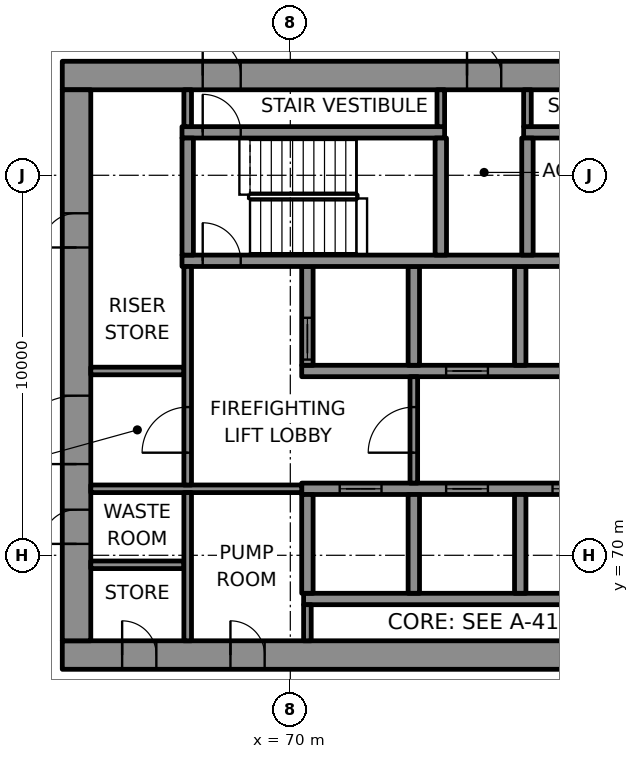
"""IFC4 building model, lengths in metres.
Left out: names, types, materials, properties, quantities, classifications, styles, units other than length and angle.
Written with IfcOpenShell. Run it as: python <this file> out.ifc"""

import sys

from ifc_helpers import new_model, si_unit, direction, frame, frame_2d, origin, place, context, subcontext, project, spatial, rectangle, extrude, element, fill, save


model = new_model("IFC4")
c1 = context("Model", 3, precision=1e-05, world=origin(), true_north=direction((0.0, 1.0)))
c2 = subcontext(c1, "Body", "Model", "MODEL_VIEW")
j1 = project(units=[si_unit("LENGTHUNIT", "METRE"), si_unit("PLANEANGLEUNIT", "RADIAN")], contexts=[c1])
p1 = place(None, origin())
s1 = spatial("IfcSite", under=j1, at=p1, CompositionType="ELEMENT")
p2 = place(p1, origin())
s2 = spatial("IfcBuilding", under=s1, at=p2, CompositionType="ELEMENT")
p3 = place(p2, frame((0.0, 0.0, 190.9)))
s3 = spatial("IfcBuildingStorey", under=s2, at=p3, CompositionType="ELEMENT", Elevation=190.9)
p4 = place(p3, frame((64.0, 67.375, 0.0), z_axis=(0.0, 0.0, 1.0), x_axis=(1.0, 0.0, 0.0)))
e1 = element("IfcWall", 1, at=p4, inside=s3, PredefinedType="SHEAR", context=c2, shape_type="SweptSolid", body=[
    extrude(rectangle(XDim=22.0, YDim=0.75, at=frame_2d((11.0, 0.0))), origin(), (0.0, 0.0, 1.0), 3.7),
])
p5 = place(p4, frame((1.575, 0.0, 0.0)))
e2 = element("IfcOpeningElement", 2, at=p5, cuts=e1, PredefinedType="OPENING", context=c2, shape_type="SweptSolid", body=[
    extrude(rectangle(XDim=0.9, YDim=2.1, at=frame_2d((0.45, 1.05))), frame((0.0, 0.385, 0.0), z_axis=(0.0, -1.0, 0.0), x_axis=(1.0, 0.0, 0.0)), (0.0, 0.0, 1.0), 0.77),
])
p6 = place(p4, frame((4.425, 0.0, 0.0)))
e3 = element("IfcOpeningElement", 3, at=p6, cuts=e1, PredefinedType="OPENING", context=c2, shape_type="SweptSolid", body=[
    extrude(rectangle(XDim=0.9, YDim=2.1, at=frame_2d((0.45, 1.05))), frame((0.0, 0.385, 0.0), z_axis=(0.0, -1.0, 0.0), x_axis=(1.0, 0.0, 0.0)), (0.0, 0.0, 1.0), 0.77),
])
p7 = place(p3, frame((64.0, 82.625, 0.0), z_axis=(0.0, 0.0, 1.0), x_axis=(1.0, 0.0, 0.0)))
e4 = element("IfcWall", 4, at=p7, inside=s3, PredefinedType="SHEAR", context=c2, shape_type="SweptSolid", body=[
    extrude(rectangle(XDim=22.0, YDim=0.75, at=frame_2d((11.0, 0.0))), origin(), (0.0, 0.0, 1.0), 3.7),
])
p8 = place(p7, frame((3.695, 0.0, 0.0)))
e5 = element("IfcOpeningElement", 5, at=p8, cuts=e4, PredefinedType="OPENING", context=c2, shape_type="SweptSolid", body=[
    extrude(rectangle(XDim=1.0, YDim=2.1, at=frame_2d((0.5, 1.05))), frame((0.0, 0.385, 0.0), z_axis=(0.0, -1.0, 0.0), x_axis=(1.0, 0.0, 0.0)), (0.0, 0.0, 1.0), 0.77),
])
p9 = place(p7, frame((17.505, 0.0, 0.0)))
e6 = element("IfcOpeningElement", 6, at=p9, cuts=e4, PredefinedType="OPENING", context=c2, shape_type="SweptSolid", body=[
    extrude(rectangle(XDim=1.0, YDim=2.1, at=frame_2d((0.5, 1.05))), frame((0.0, 0.385, 0.0), z_axis=(0.0, -1.0, 0.0), x_axis=(1.0, 0.0, 0.0)), (0.0, 0.0, 1.0), 0.77),
])
p10 = place(p7, frame((10.65, 0.0, 0.0)))
e7 = element("IfcOpeningElement", 7, at=p10, cuts=e4, PredefinedType="OPENING", context=c2, shape_type="SweptSolid", body=[
    extrude(rectangle(XDim=0.9, YDim=2.1, at=frame_2d((0.45, 1.05))), frame((0.0, 0.385, 0.0), z_axis=(0.0, -1.0, 0.0), x_axis=(1.0, 0.0, 0.0)), (0.0, 0.0, 1.0), 0.77),
])
p11 = place(p3, frame((64.375, 67.75, 0.0), z_axis=(0.0, 0.0, 1.0), x_axis=(0.0, 1.0, 0.0)))
e8 = element("IfcWall", 8, at=p11, inside=s3, PredefinedType="SHEAR", context=c2, shape_type="SweptSolid", body=[
    extrude(rectangle(XDim=14.5, YDim=0.75, at=frame_2d((7.25, 0.0))), origin(), (0.0, 0.0, 1.0), 3.7),
])
p12 = place(p11, frame((4.65, 0.0, 0.0)))
e9 = element("IfcOpeningElement", 9, at=p12, cuts=e8, PredefinedType="OPENING", context=c2, shape_type="SweptSolid", body=[
    extrude(rectangle(XDim=1.8, YDim=2.1, at=frame_2d((0.9, 1.05))), frame((0.0, 0.385, 0.0), z_axis=(0.0, -1.0, 0.0), x_axis=(1.0, 0.0, 0.0)), (0.0, 0.0, 1.0), 0.77),
])
p13 = place(p11, frame((2.55, 0.0, 0.0)))
e10 = element("IfcOpeningElement", 10, at=p13, cuts=e8, PredefinedType="OPENING", context=c2, shape_type="SweptSolid", body=[
    extrude(rectangle(XDim=0.9, YDim=2.1, at=frame_2d((0.45, 1.05))), frame((0.0, 0.385, 0.0), z_axis=(0.0, -1.0, 0.0), x_axis=(1.0, 0.0, 0.0)), (0.0, 0.0, 1.0), 0.77),
])
p14 = place(p11, frame((10.35, 0.0, 0.0)))
e11 = element("IfcOpeningElement", 11, at=p14, cuts=e8, PredefinedType="OPENING", context=c2, shape_type="SweptSolid", body=[
    extrude(rectangle(XDim=0.9, YDim=2.1, at=frame_2d((0.45, 1.05))), frame((0.0, 0.385, 0.0), z_axis=(0.0, -1.0, 0.0), x_axis=(1.0, 0.0, 0.0)), (0.0, 0.0, 1.0), 0.77),
])
p15 = place(p3, frame((70.35, 68.85, 0.0), z_axis=(0.0, 0.0, 1.0), x_axis=(1.0, 0.0, 0.0)))
e12 = element("IfcWall", 12, at=p15, inside=s3, PredefinedType="SHEAR", context=c2, shape_type="SweptSolid", body=[
    extrude(rectangle(XDim=14.2, YDim=0.3, at=frame_2d((7.1, 0.0))), origin(), (0.0, 0.0, 1.0), 3.7),
])
p16 = place(p3, frame((70.3, 71.75, 0.0), z_axis=(0.0, 0.0, 1.0), x_axis=(1.0, 0.0, 0.0)))
e13 = element("IfcWall", 13, at=p16, inside=s3, PredefinedType="SHEAR", context=c2, shape_type="SweptSolid", body=[
    extrude(rectangle(XDim=14.3, YDim=0.3, at=frame_2d((7.15, 0.0))), origin(), (0.0, 0.0, 1.0), 3.7),
])
p17 = place(p16, frame((1.0, 0.0, 0.0)))
e14 = element("IfcOpeningElement", 14, at=p17, cuts=e13, PredefinedType="OPENING", context=c2, shape_type="SweptSolid", body=[
    extrude(rectangle(XDim=1.1, YDim=2.1, at=frame_2d((0.55, 1.05))), frame((0.0, 0.16, 0.0), z_axis=(0.0, -1.0, 0.0), x_axis=(1.0, 0.0, 0.0)), (0.0, 0.0, 1.0), 0.32),
])
p18 = place(p16, frame((3.8, 0.0, 0.0)))
e15 = element("IfcOpeningElement", 15, at=p18, cuts=e13, PredefinedType="OPENING", context=c2, shape_type="SweptSolid", body=[
    extrude(rectangle(XDim=1.1, YDim=2.1, at=frame_2d((0.55, 1.05))), frame((0.0, 0.16, 0.0), z_axis=(0.0, -1.0, 0.0), x_axis=(1.0, 0.0, 0.0)), (0.0, 0.0, 1.0), 0.32),
])
p19 = place(p16, frame((6.6, 0.0, 0.0)))
e16 = element("IfcOpeningElement", 16, at=p19, cuts=e13, PredefinedType="OPENING", context=c2, shape_type="SweptSolid", body=[
    extrude(rectangle(XDim=1.1, YDim=2.1, at=frame_2d((0.55, 1.05))), frame((0.0, 0.16, 0.0), z_axis=(0.0, -1.0, 0.0), x_axis=(1.0, 0.0, 0.0)), (0.0, 0.0, 1.0), 0.32),
])
p20 = place(p16, frame((9.4, 0.0, 0.0)))
e17 = element("IfcOpeningElement", 17, at=p20, cuts=e13, PredefinedType="OPENING", context=c2, shape_type="SweptSolid", body=[
    extrude(rectangle(XDim=1.1, YDim=2.1, at=frame_2d((0.55, 1.05))), frame((0.0, 0.16, 0.0), z_axis=(0.0, -1.0, 0.0), x_axis=(1.0, 0.0, 0.0)), (0.0, 0.0, 1.0), 0.32),
])
p21 = place(p16, frame((12.2, 0.0, 0.0)))
e18 = element("IfcOpeningElement", 18, at=p21, cuts=e13, PredefinedType="OPENING", context=c2, shape_type="SweptSolid", body=[
    extrude(rectangle(XDim=1.1, YDim=2.1, at=frame_2d((0.55, 1.05))), frame((0.0, 0.16, 0.0), z_axis=(0.0, -1.0, 0.0), x_axis=(1.0, 0.0, 0.0)), (0.0, 0.0, 1.0), 0.32),
])
p22 = place(p3, frame((70.3, 74.85, 0.0), z_axis=(0.0, 0.0, 1.0), x_axis=(1.0, 0.0, 0.0)))
e19 = element("IfcWall", 19, at=p22, inside=s3, PredefinedType="SHEAR", context=c2, shape_type="SweptSolid", body=[
    extrude(rectangle(XDim=14.3, YDim=0.3, at=frame_2d((7.15, 0.0))), origin(), (0.0, 0.0, 1.0), 3.7),
])
p23 = place(p22, frame((3.8, 0.0, 0.0)))
e20 = element("IfcOpeningElement", 20, at=p23, cuts=e19, PredefinedType="OPENING", context=c2, shape_type="SweptSolid", body=[
    extrude(rectangle(XDim=1.1, YDim=2.1, at=frame_2d((0.55, 1.05))), frame((0.0, 0.16, 0.0), z_axis=(0.0, -1.0, 0.0), x_axis=(1.0, 0.0, 0.0)), (0.0, 0.0, 1.0), 0.32),
])
p24 = place(p22, frame((12.2, 0.0, 0.0)))
e21 = element("IfcOpeningElement", 21, at=p24, cuts=e19, PredefinedType="OPENING", context=c2, shape_type="SweptSolid", body=[
    extrude(rectangle(XDim=1.1, YDim=2.1, at=frame_2d((0.55, 1.05))), frame((0.0, 0.16, 0.0), z_axis=(0.0, -1.0, 0.0), x_axis=(1.0, 0.0, 0.0)), (0.0, 0.0, 1.0), 0.32),
])
p25 = place(p3, frame((70.45, 69.0, 0.0), z_axis=(0.0, 0.0, 1.0), x_axis=(0.0, 1.0, 0.0)))
e22 = element("IfcWall", 22, at=p25, inside=s3, PredefinedType="SHEAR", context=c2, shape_type="SweptSolid", body=[
    extrude(rectangle(XDim=2.6, YDim=0.3, at=frame_2d((1.3, 0.0))), origin(), (0.0, 0.0, 1.0), 3.7),
])
p26 = place(p3, frame((70.45, 75.0, 0.0), z_axis=(0.0, 0.0, 1.0), x_axis=(0.0, 1.0, 0.0)))
e23 = element("IfcWall", 23, at=p26, inside=s3, PredefinedType="SHEAR", context=c2, shape_type="SweptSolid", body=[
    extrude(rectangle(XDim=2.6, YDim=0.3, at=frame_2d((1.3, 0.0))), origin(), (0.0, 0.0, 1.0), 3.7),
])
p27 = place(p26, frame((0.15, 0.0, 0.0)))
e24 = element("IfcOpeningElement", 24, at=p27, cuts=e23, PredefinedType="OPENING", context=c2, shape_type="SweptSolid", body=[
    extrude(rectangle(XDim=1.1, YDim=2.1, at=frame_2d((0.55, 1.05))), frame((0.0, 0.16, 0.0), z_axis=(0.0, -1.0, 0.0), x_axis=(1.0, 0.0, 0.0)), (0.0, 0.0, 1.0), 0.32),
])
for number, where, z_axis, x_axis in (
    (25, (73.25, 69.0, 0.0), (0.0, 0.0, 1.0), (0.0, 1.0, 0.0)),
    (26, (73.25, 75.0, 0.0), (0.0, 0.0, 1.0), (0.0, 1.0, 0.0)),
    (27, (76.05, 69.0, 0.0), (0.0, 0.0, 1.0), (0.0, 1.0, 0.0)),
    (28, (76.05, 75.0, 0.0), (0.0, 0.0, 1.0), (0.0, 1.0, 0.0)),
):
    element("IfcWall", number, at=place(p3, frame(where, z_axis=z_axis, x_axis=x_axis)), inside=s3, PredefinedType="SHEAR", context=c2, shape_type="SweptSolid", body=[
        extrude(rectangle(XDim=2.6, YDim=0.3, at=frame_2d((1.3, 0.0))), origin(), (0.0, 0.0, 1.0), 3.7),
    ])
p28 = place(p3, frame((67.15, 77.75, 0.0), z_axis=(0.0, 0.0, 1.0), x_axis=(1.0, 0.0, 0.0)))
e29 = element("IfcWall", 29, at=p28, inside=s3, PredefinedType="SHEAR", context=c2, shape_type="SweptSolid", body=[
    extrude(rectangle(XDim=17.45, YDim=0.3, at=frame_2d((8.725, 0.0))), origin(), (0.0, 0.0, 1.0), 3.7),
])
p29 = place(p28, frame((0.545, 0.0, 0.0)))
e30 = element("IfcOpeningElement", 30, at=p29, cuts=e29, PredefinedType="OPENING", context=c2, shape_type="SweptSolid", body=[
    extrude(rectangle(XDim=1.0, YDim=2.1, at=frame_2d((0.5, 1.05))), frame((0.0, 0.16, 0.0), z_axis=(0.0, -1.0, 0.0), x_axis=(1.0, 0.0, 0.0)), (0.0, 0.0, 1.0), 0.32),
])
p30 = place(p3, frame((67.15, 81.13, 0.0), z_axis=(0.0, 0.0, 1.0), x_axis=(1.0, 0.0, 0.0)))
e31 = element("IfcWall", 31, at=p30, inside=s3, PredefinedType="SHEAR", context=c2, shape_type="SweptSolid", body=[
    extrude(rectangle(XDim=6.91, YDim=0.3, at=frame_2d((3.455, 0.0))), origin(), (0.0, 0.0, 1.0), 3.7),
])
p31 = place(p30, frame((0.545, 0.0, 0.0)))
e32 = element("IfcOpeningElement", 32, at=p31, cuts=e31, PredefinedType="OPENING", context=c2, shape_type="SweptSolid", body=[
    extrude(rectangle(XDim=1.0, YDim=2.1, at=frame_2d((0.5, 1.05))), frame((0.0, 0.16, 0.0), z_axis=(0.0, -1.0, 0.0), x_axis=(1.0, 0.0, 0.0)), (0.0, 0.0, 1.0), 0.32),
])
p32 = place(p3, frame((76.14, 81.13, 0.0), z_axis=(0.0, 0.0, 1.0), x_axis=(1.0, 0.0, 0.0)))
e33 = element("IfcWall", 33, at=p32, inside=s3, PredefinedType="SHEAR", context=c2, shape_type="SweptSolid", body=[
    extrude(rectangle(XDim=6.86, YDim=0.3, at=frame_2d((3.43, 0.0))), origin(), (0.0, 0.0, 1.0), 3.7),
])
p33 = place(p32, frame((5.365, 0.0, 0.0)))
e34 = element("IfcOpeningElement", 34, at=p33, cuts=e33, PredefinedType="OPENING", context=c2, shape_type="SweptSolid", body=[
    extrude(rectangle(XDim=1.0, YDim=2.1, at=frame_2d((0.5, 1.05))), frame((0.0, 0.16, 0.0), z_axis=(0.0, -1.0, 0.0), x_axis=(1.0, 0.0, 0.0)), (0.0, 0.0, 1.0), 0.32),
])
for number, where, z_axis, x_axis in (
    (35, (67.3, 77.9, 0.0), (0.0, 0.0, 1.0), (0.0, 1.0, 0.0)),
    (36, (73.96, 77.9, 0.0), (0.0, 0.0, 1.0), (0.0, 1.0, 0.0)),
    (37, (76.24, 77.9, 0.0), (0.0, 0.0, 1.0), (0.0, 1.0, 0.0)),
):
    element("IfcWall", number, at=place(p3, frame(where, z_axis=z_axis, x_axis=x_axis)), inside=s3, PredefinedType="SHEAR", context=c2, shape_type="SweptSolid", body=[
        extrude(rectangle(XDim=3.08, YDim=0.3, at=frame_2d((1.54, 0.0))), origin(), (0.0, 0.0, 1.0), 3.7),
    ])
p34 = place(p3, frame((64.75, 69.75, 0.0), z_axis=(0.0, 0.0, 1.0), x_axis=(1.0, 0.0, 0.0)))
e38 = element("IfcWall", 38, at=p34, inside=s3, PredefinedType="PARTITIONING", context=c2, shape_type="SweptSolid", body=[
    extrude(rectangle(XDim=2.45, YDim=0.2, at=frame_2d((1.225, 0.0))), origin(), (0.0, 0.0, 1.0), 3.7),
])
p35 = place(p3, frame((64.75, 71.75, 0.0), z_axis=(0.0, 0.0, 1.0), x_axis=(1.0, 0.0, 0.0)))
e39 = element("IfcWall", 39, at=p35, inside=s3, PredefinedType="PARTITIONING", context=c2, shape_type="SweptSolid", body=[
    extrude(rectangle(XDim=5.55, YDim=0.2, at=frame_2d((2.775, 0.0))), origin(), (0.0, 0.0, 1.0), 3.7),
])
p36 = place(p3, frame((64.75, 74.85, 0.0), z_axis=(0.0, 0.0, 1.0), x_axis=(1.0, 0.0, 0.0)))
e40 = element("IfcWall", 40, at=p36, inside=s3, PredefinedType="PARTITIONING", context=c2, shape_type="SweptSolid", body=[
    extrude(rectangle(XDim=2.45, YDim=0.2, at=frame_2d((1.225, 0.0))), origin(), (0.0, 0.0, 1.0), 3.7),
])
p37 = place(p3, frame((67.3, 67.75, 0.0), z_axis=(0.0, 0.0, 1.0), x_axis=(0.0, 1.0, 0.0)))
e41 = element("IfcWall", 41, at=p37, inside=s3, PredefinedType="PARTITIONING", context=c2, shape_type="SweptSolid", body=[
    extrude(rectangle(XDim=3.9, YDim=0.2, at=frame_2d((1.95, 0.0))), origin(), (0.0, 0.0, 1.0), 3.7),
])
p38 = place(p3, frame((67.3, 71.85, 0.0), z_axis=(0.0, 0.0, 1.0), x_axis=(0.0, 1.0, 0.0)))
e42 = element("IfcWall", 42, at=p38, inside=s3, PredefinedType="PARTITIONING", context=c2, shape_type="SweptSolid", body=[
    extrude(rectangle(XDim=5.75, YDim=0.2, at=frame_2d((2.875, 0.0))), origin(), (0.0, 0.0, 1.0), 3.7),
])
p39 = place(p38, frame((0.85, 0.0, 0.0)))
e43 = element("IfcOpeningElement", 43, at=p39, cuts=e42, PredefinedType="OPENING", context=c2, shape_type="SweptSolid", body=[
    extrude(rectangle(XDim=1.2, YDim=2.1, at=frame_2d((0.6, 1.05))), frame((0.0, 0.11, 0.0), z_axis=(0.0, -1.0, 0.0), x_axis=(1.0, 0.0, 0.0)), (0.0, 0.0, 1.0), 0.22),
])
p40 = place(p3, frame((67.3, 81.28, 0.0), z_axis=(0.0, 0.0, 1.0), x_axis=(0.0, 1.0, 0.0)))
e44 = element("IfcWall", 44, at=p40, inside=s3, PredefinedType="PARTITIONING", context=c2, shape_type="SweptSolid", body=[
    extrude(rectangle(XDim=0.97, YDim=0.2, at=frame_2d((0.485, 0.0))), origin(), (0.0, 0.0, 1.0), 3.7),
])
p41 = place(p3, frame((70.45, 67.75, 0.0), z_axis=(0.0, 0.0, 1.0), x_axis=(0.0, 1.0, 0.0)))
e45 = element("IfcWall", 45, at=p41, inside=s3, PredefinedType="PARTITIONING", context=c2, shape_type="SweptSolid", body=[
    extrude(rectangle(XDim=0.95, YDim=0.2, at=frame_2d((0.475, 0.0))), origin(), (0.0, 0.0, 1.0), 3.7),
])
p42 = place(p3, frame((73.25, 71.9, 0.0), z_axis=(0.0, 0.0, 1.0), x_axis=(0.0, 1.0, 0.0)))
e46 = element("IfcWall", 46, at=p42, inside=s3, PredefinedType="PARTITIONING", context=c2, shape_type="SweptSolid", body=[
    extrude(rectangle(XDim=2.8, YDim=0.2, at=frame_2d((1.4, 0.0))), origin(), (0.0, 0.0, 1.0), 3.7),
])
p43 = place(p42, frame((0.8, 0.0, 0.0)))
e47 = element("IfcOpeningElement", 47, at=p43, cuts=e46, PredefinedType="OPENING", context=c2, shape_type="SweptSolid", body=[
    extrude(rectangle(XDim=1.2, YDim=2.1, at=frame_2d((0.6, 1.05))), frame((0.0, 0.11, 0.0), z_axis=(0.0, -1.0, 0.0), x_axis=(1.0, 0.0, 0.0)), (0.0, 0.0, 1.0), 0.22),
])
for number, where, z_axis, x_axis in (
    (48, (73.96, 81.28, 0.0), (0.0, 0.0, 1.0), (0.0, 1.0, 0.0)),
    (49, (76.24, 81.28, 0.0), (0.0, 0.0, 1.0), (0.0, 1.0, 0.0)),
):
    element("IfcWall", number, at=place(p3, frame(where, z_axis=z_axis, x_axis=x_axis)), inside=s3, PredefinedType="PARTITIONING", context=c2, shape_type="SweptSolid", body=[
        extrude(rectangle(XDim=0.97, YDim=0.2, at=frame_2d((0.485, 0.0))), origin(), (0.0, 0.0, 1.0), 3.7),
    ])
p44 = place(p17, origin())
e50 = element("IfcDoor", 50, at=p44, inside=s3, OperationType="DOUBLE_DOOR_SLIDING", PredefinedType="DOOR", context=c2, shape_type="SweptSolid", body=[
    extrude(rectangle(XDim=1.1, YDim=2.1, at=frame_2d((0.55, 1.05))), frame((0.0, 0.025, 0.0), z_axis=(0.0, -1.0, 0.0), x_axis=(1.0, 0.0, 0.0)), (0.0, 0.0, 1.0), 0.05),
])
fill(e14, e50)
p45 = place(p18, origin())
e51 = element("IfcDoor", 51, at=p45, inside=s3, OperationType="DOUBLE_DOOR_SLIDING", PredefinedType="DOOR", context=c2, shape_type="SweptSolid", body=[
    extrude(rectangle(XDim=1.1, YDim=2.1, at=frame_2d((0.55, 1.05))), frame((0.0, 0.025, 0.0), z_axis=(0.0, -1.0, 0.0), x_axis=(1.0, 0.0, 0.0)), (0.0, 0.0, 1.0), 0.05),
])
fill(e15, e51)
p46 = place(p19, origin())
e52 = element("IfcDoor", 52, at=p46, inside=s3, OperationType="DOUBLE_DOOR_SLIDING", PredefinedType="DOOR", context=c2, shape_type="SweptSolid", body=[
    extrude(rectangle(XDim=1.1, YDim=2.1, at=frame_2d((0.55, 1.05))), frame((0.0, 0.025, 0.0), z_axis=(0.0, -1.0, 0.0), x_axis=(1.0, 0.0, 0.0)), (0.0, 0.0, 1.0), 0.05),
])
fill(e16, e52)
p47 = place(p27, origin())
e53 = element("IfcDoor", 53, at=p47, inside=s3, OperationType="DOUBLE_DOOR_SLIDING", PredefinedType="DOOR", context=c2, shape_type="SweptSolid", body=[
    extrude(rectangle(XDim=1.1, YDim=2.1, at=frame_2d((0.55, 1.05))), frame((0.0, 0.025, 0.0), z_axis=(0.0, -1.0, 0.0), x_axis=(1.0, 0.0, 0.0)), (0.0, 0.0, 1.0), 0.05),
])
fill(e24, e53)
p48 = place(p23, origin())
e54 = element("IfcDoor", 54, at=p48, inside=s3, OperationType="DOUBLE_DOOR_SLIDING", PredefinedType="DOOR", context=c2, shape_type="SweptSolid", body=[
    extrude(rectangle(XDim=1.1, YDim=2.1, at=frame_2d((0.55, 1.05))), frame((0.0, 0.025, 0.0), z_axis=(0.0, -1.0, 0.0), x_axis=(1.0, 0.0, 0.0)), (0.0, 0.0, 1.0), 0.05),
])
fill(e20, e54)
p49 = place(p29, origin())
e55 = element("IfcDoor", 55, at=p49, inside=s3, OperationType="SINGLE_SWING_LEFT", PredefinedType="DOOR", context=c2, shape_type="SweptSolid", body=[
    extrude(rectangle(XDim=1.0, YDim=2.1, at=frame_2d((0.5, 1.05))), frame((0.0, 0.025, 0.0), z_axis=(0.0, -1.0, 0.0), x_axis=(1.0, 0.0, 0.0)), (0.0, 0.0, 1.0), 0.05),
])
fill(e30, e55)
p50 = place(p31, origin())
e56 = element("IfcDoor", 56, at=p50, inside=s3, OperationType="SINGLE_SWING_RIGHT", PredefinedType="DOOR", context=c2, shape_type="SweptSolid", body=[
    extrude(rectangle(XDim=1.0, YDim=2.1, at=frame_2d((0.5, 1.05))), frame((0.0, 0.025, 0.0), z_axis=(0.0, -1.0, 0.0), x_axis=(1.0, 0.0, 0.0)), (0.0, 0.0, 1.0), 0.05),
])
fill(e32, e56)
p51 = place(p8, origin())
e57 = element("IfcDoor", 57, at=p51, inside=s3, OperationType="SINGLE_SWING_LEFT", PredefinedType="DOOR", context=c2, shape_type="SweptSolid", body=[
    extrude(rectangle(XDim=1.0, YDim=2.1, at=frame_2d((0.5, 1.05))), frame((0.0, 0.095, 0.0), z_axis=(0.0, -1.0, 0.0), x_axis=(1.0, 0.0, 0.0)), (0.0, 0.0, 1.0), 0.19),
])
fill(e5, e57)
p52 = place(p43, origin())
e58 = element("IfcDoor", 58, at=p52, inside=s3, OperationType="SINGLE_SWING_LEFT", PredefinedType="DOOR", context=c2, shape_type="SweptSolid", body=[
    extrude(rectangle(XDim=1.2, YDim=2.1, at=frame_2d((0.6, 1.05))), frame((0.0, 0.025, 0.0), z_axis=(0.0, -1.0, 0.0), x_axis=(1.0, 0.0, 0.0)), (0.0, 0.0, 1.0), 0.05),
])
fill(e47, e58)
p53 = place(p39, origin())
e59 = element("IfcDoor", 59, at=p53, inside=s3, OperationType="SINGLE_SWING_RIGHT", PredefinedType="DOOR", context=c2, shape_type="SweptSolid", body=[
    extrude(rectangle(XDim=1.2, YDim=2.1, at=frame_2d((0.6, 1.05))), frame((0.0, 0.025, 0.0), z_axis=(0.0, -1.0, 0.0), x_axis=(1.0, 0.0, 0.0)), (0.0, 0.0, 1.0), 0.05),
])
fill(e43, e59)
p54 = place(p12, origin())
e60 = element("IfcDoor", 60, at=p54, inside=s3, OperationType="SINGLE_SWING_LEFT", PredefinedType="DOOR", context=c2, shape_type="SweptSolid", body=[
    extrude(rectangle(XDim=1.8, YDim=2.1, at=frame_2d((0.9, 1.05))), frame((0.0, 0.095, 0.0), z_axis=(0.0, -1.0, 0.0), x_axis=(1.0, 0.0, 0.0)), (0.0, 0.0, 1.0), 0.19),
])
fill(e9, e60)
p55 = place(p5, origin())
e61 = element("IfcDoor", 61, at=p55, inside=s3, OperationType="SINGLE_SWING_LEFT", PredefinedType="DOOR", context=c2, shape_type="SweptSolid", body=[
    extrude(rectangle(XDim=0.9, YDim=2.1, at=frame_2d((0.45, 1.05))), frame((0.0, 0.095, 0.0), z_axis=(0.0, -1.0, 0.0), x_axis=(1.0, 0.0, 0.0)), (0.0, 0.0, 1.0), 0.19),
])
fill(e2, e61)
p56 = place(p13, origin())
e62 = element("IfcDoor", 62, at=p56, inside=s3, OperationType="SINGLE_SWING_RIGHT", PredefinedType="DOOR", context=c2, shape_type="SweptSolid", body=[
    extrude(rectangle(XDim=0.9, YDim=2.1, at=frame_2d((0.45, 1.05))), frame((0.0, 0.095, 0.0), z_axis=(0.0, -1.0, 0.0), x_axis=(1.0, 0.0, 0.0)), (0.0, 0.0, 1.0), 0.19),
])
fill(e10, e62)
p57 = place(p6, origin())
e63 = element("IfcDoor", 63, at=p57, inside=s3, OperationType="SINGLE_SWING_LEFT", PredefinedType="DOOR", context=c2, shape_type="SweptSolid", body=[
    extrude(rectangle(XDim=0.9, YDim=2.1, at=frame_2d((0.45, 1.05))), frame((0.0, 0.095, 0.0), z_axis=(0.0, -1.0, 0.0), x_axis=(1.0, 0.0, 0.0)), (0.0, 0.0, 1.0), 0.19),
])
fill(e3, e63)
p58 = place(p14, origin())
e64 = element("IfcDoor", 64, at=p58, inside=s3, OperationType="SINGLE_SWING_RIGHT", PredefinedType="DOOR", context=c2, shape_type="SweptSolid", body=[
    extrude(rectangle(XDim=0.9, YDim=2.1, at=frame_2d((0.45, 1.05))), frame((0.0, 0.095, 0.0), z_axis=(0.0, -1.0, 0.0), x_axis=(1.0, 0.0, 0.0)), (0.0, 0.0, 1.0), 0.19),
])
fill(e11, e64)
p59 = place(p10, origin())
e65 = element("IfcDoor", 65, at=p59, inside=s3, OperationType="SINGLE_SWING_LEFT", PredefinedType="DOOR", context=c2, shape_type="SweptSolid", body=[
    extrude(rectangle(XDim=0.9, YDim=2.1, at=frame_2d((0.45, 1.05))), frame((0.0, 0.095, 0.0), z_axis=(0.0, -1.0, 0.0), x_axis=(1.0, 0.0, 0.0)), (0.0, 0.0, 1.0), 0.19),
])
fill(e7, e65)
save(model, sys.argv[1])
